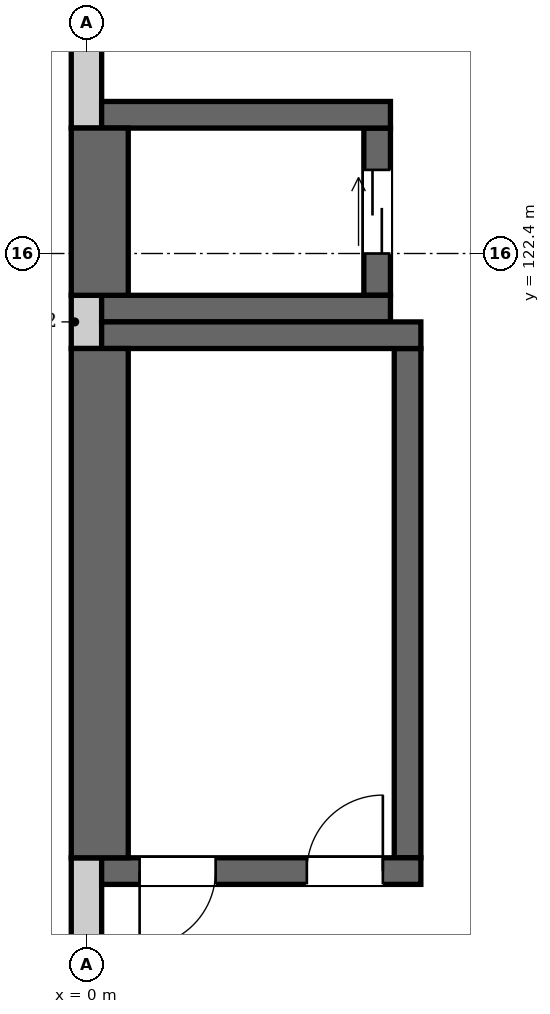
"""IFC4 building model, lengths in metres.
Left out: names, types, materials, properties, quantities, classifications, styles, units other than length and angle.
Written with IfcOpenShell. Run it as: python <this file> out.ifc"""

import sys

from ifc_helpers import new_model, si_unit, direction, frame, frame_2d, origin, place, context, subcontext, project, spatial, rectangle, extrude, element, fill, save


model = new_model("IFC4")
c1 = context("Model", 3, precision=1e-05, world=origin(), true_north=direction((0.0, 1.0)))
c2 = subcontext(c1, "Body", "Model", "MODEL_VIEW")
j1 = project(units=[si_unit("LENGTHUNIT", "METRE"), si_unit("PLANEANGLEUNIT", "RADIAN")], contexts=[c1])
p1 = place(None, origin())
s1 = spatial("IfcSite", under=j1, at=p1, CompositionType="ELEMENT")
p2 = place(p1, origin())
s2 = spatial("IfcBuilding", under=s1, at=p2, CompositionType="ELEMENT")
p3 = place(p2, frame((0.0, 0.0, 31.9)))
s3 = spatial("IfcBuildingStorey", under=s2, at=p3, CompositionType="ELEMENT", Elevation=31.9)
p4 = place(p3, frame((0.2, 114.275, 0.0), z_axis=(0.0, 0.0, 1.0), x_axis=(1.0, 0.0, 0.0)))
e1 = element("IfcWall", 1, at=p4, inside=s3, PredefinedType="SHEAR", context=c2, shape_type="SweptSolid", body=[
    extrude(rectangle(XDim=4.2, YDim=0.35, at=frame_2d((2.1, 0.0))), origin(), (0.0, 0.0, 1.0), 3.2),
])
p5 = place(p4, frame((0.5, 0.0, 0.0)))
e2 = element("IfcOpeningElement", 2, at=p5, cuts=e1, PredefinedType="OPENING", context=c2, shape_type="SweptSolid", body=[
    extrude(rectangle(XDim=1.0, YDim=2.1, at=frame_2d((0.5, 1.05))), frame((0.0, 0.185, 0.0), z_axis=(0.0, -1.0, 0.0), x_axis=(1.0, 0.0, 0.0)), (0.0, 0.0, 1.0), 0.37),
])
p6 = place(p4, frame((2.7, 0.0, 0.0)))
e3 = element("IfcOpeningElement", 3, at=p6, cuts=e1, PredefinedType="OPENING", context=c2, shape_type="SweptSolid", body=[
    extrude(rectangle(XDim=1.0, YDim=2.1, at=frame_2d((0.5, 1.05))), frame((0.0, 0.185, 0.0), z_axis=(0.0, -1.0, 0.0), x_axis=(1.0, 0.0, 0.0)), (0.0, 0.0, 1.0), 0.37),
])
p7 = place(p3, frame((0.2, 121.325, 0.0), z_axis=(0.0, 0.0, 1.0), x_axis=(1.0, 0.0, 0.0)))
e4 = element("IfcWall", 4, at=p7, inside=s3, PredefinedType="SHEAR", context=c2, shape_type="SweptSolid", body=[
    extrude(rectangle(XDim=4.2, YDim=0.35, at=frame_2d((2.1, 0.0))), origin(), (0.0, 0.0, 1.0), 3.2),
])
p8 = place(p3, frame((0.176, 114.45, 0.0), z_axis=(0.0, 0.0, 1.0), x_axis=(0.0, 1.0, 0.0)))
e5 = element("IfcWall", 5, at=p8, inside=s3, PredefinedType="SHEAR", context=c2, shape_type="SweptSolid", body=[
    extrude(rectangle(XDim=6.7, YDim=0.75, at=frame_2d((3.35, 0.0))), origin(), (0.0, 0.0, 1.0), 3.2),
])
p9 = place(p3, frame((4.225, 114.45, 0.0), z_axis=(0.0, 0.0, 1.0), x_axis=(0.0, 1.0, 0.0)))
e6 = element("IfcWall", 6, at=p9, inside=s3, PredefinedType="SHEAR", context=c2, shape_type="SweptSolid", body=[
    extrude(rectangle(XDim=6.7, YDim=0.35, at=frame_2d((3.35, 0.0))), origin(), (0.0, 0.0, 1.0), 3.2),
])
for number, where, z_axis, x_axis in (
    (7, (0.2, 121.675, 0.0), (0.0, 0.0, 1.0), (1.0, 0.0, 0.0)),
    (8, (0.2, 124.225, 0.0), (0.0, 0.0, 1.0), (1.0, 0.0, 0.0)),
):
    element("IfcWall", number, at=place(p3, frame(where, z_axis=z_axis, x_axis=x_axis)), inside=s3, PredefinedType="SHEAR", context=c2, shape_type="SweptSolid", body=[
        extrude(rectangle(XDim=3.8, YDim=0.35, at=frame_2d((1.9, 0.0))), origin(), (0.0, 0.0, 1.0), 4.2),
    ])
p10 = place(p3, frame((0.176, 121.85, 0.0), z_axis=(0.0, 0.0, 1.0), x_axis=(0.0, 1.0, 0.0)))
e9 = element("IfcWall", 9, at=p10, inside=s3, PredefinedType="SHEAR", context=c2, shape_type="SweptSolid", body=[
    extrude(rectangle(XDim=2.2, YDim=0.75, at=frame_2d((1.1, 0.0))), origin(), (0.0, 0.0, 1.0), 4.2),
])
p11 = place(p3, frame((3.825, 121.85, 0.0), z_axis=(0.0, 0.0, 1.0), x_axis=(0.0, 1.0, 0.0)))
e10 = element("IfcWall", 10, at=p11, inside=s3, PredefinedType="SHEAR", context=c2, shape_type="SweptSolid", body=[
    extrude(rectangle(XDim=2.2, YDim=0.35, at=frame_2d((1.1, 0.0))), origin(), (0.0, 0.0, 1.0), 4.2),
])
p12 = place(p11, frame((0.55, 0.0, 0.0)))
e11 = element("IfcOpeningElement", 11, at=p12, cuts=e10, PredefinedType="OPENING", context=c2, shape_type="SweptSolid", body=[
    extrude(rectangle(XDim=1.1, YDim=2.1, at=frame_2d((0.55, 1.05))), frame((0.0, 0.185, 0.0), z_axis=(0.0, -1.0, 0.0), x_axis=(1.0, 0.0, 0.0)), (0.0, 0.0, 1.0), 0.37),
])
p13 = place(p3, frame((0.0, 114.45, 0.0), z_axis=(0.0, 0.0, 1.0), x_axis=(0.0, -1.0, 0.0)))
e12 = element("IfcWall", 12, at=p13, inside=s3, PredefinedType="PARAPET", context=c2, shape_type="SweptSolid", body=[
    extrude(rectangle(XDim=20.33, YDim=0.4, at=frame_2d((10.165, 0.0))), origin(), (0.0, 0.0, 1.0), 1.1),
])
p14 = place(p3, frame((0.0, 121.85, 0.0), z_axis=(0.0, 0.0, 1.0), x_axis=(0.0, -1.0, 0.0)))
e13 = element("IfcWall", 13, at=p14, inside=s3, PredefinedType="PARAPET", context=c2, shape_type="SweptSolid", body=[
    extrude(rectangle(XDim=0.7, YDim=0.4, at=frame_2d((0.35, 0.0))), origin(), (0.0, 0.0, 1.0), 1.1),
])
p15 = place(p3, frame((0.0, 126.85, 0.0), z_axis=(0.0, 0.0, 1.0), x_axis=(0.0, -1.0, 0.0)))
e14 = element("IfcWall", 14, at=p15, inside=s3, PredefinedType="PARAPET", context=c2, shape_type="SweptSolid", body=[
    extrude(rectangle(XDim=2.8, YDim=0.4, at=frame_2d((1.4, 0.0))), origin(), (0.0, 0.0, 1.0), 1.1),
])
p16 = place(p5, frame((1.0, 0.0, 0.0), z_axis=(0.0, 0.0, 1.0), x_axis=(-1.0, 0.0, 0.0)))
e15 = element("IfcDoor", 15, at=p16, inside=s3, OperationType="SINGLE_SWING_LEFT", PredefinedType="DOOR", context=c2, shape_type="SweptSolid", body=[
    extrude(rectangle(XDim=1.0, YDim=2.1, at=frame_2d((0.5, 1.05))), frame((0.0, 0.025, 0.0), z_axis=(0.0, -1.0, 0.0), x_axis=(1.0, 0.0, 0.0)), (0.0, 0.0, 1.0), 0.05),
])
fill(e2, e15)
p17 = place(p6, frame((1.0, 0.0, 0.0), z_axis=(0.0, 0.0, 1.0), x_axis=(-1.0, 0.0, 0.0)))
e16 = element("IfcDoor", 16, at=p17, inside=s3, OperationType="SINGLE_SWING_RIGHT", PredefinedType="DOOR", context=c2, shape_type="SweptSolid", body=[
    extrude(rectangle(XDim=1.0, YDim=2.1, at=frame_2d((0.5, 1.05))), frame((0.0, 0.025, 0.0), z_axis=(0.0, -1.0, 0.0), x_axis=(1.0, 0.0, 0.0)), (0.0, 0.0, 1.0), 0.05),
])
fill(e3, e16)
p18 = place(p12, origin())
e17 = element("IfcDoor", 17, at=p18, inside=s3, OperationType="DOUBLE_DOOR_SLIDING", PredefinedType="DOOR", context=c2, shape_type="SweptSolid", body=[
    extrude(rectangle(XDim=1.1, YDim=2.1, at=frame_2d((0.55, 1.05))), frame((0.0, 0.025, 0.0), z_axis=(0.0, -1.0, 0.0), x_axis=(1.0, 0.0, 0.0)), (0.0, 0.0, 1.0), 0.05),
])
fill(e11, e17)
save(model, sys.argv[1])
